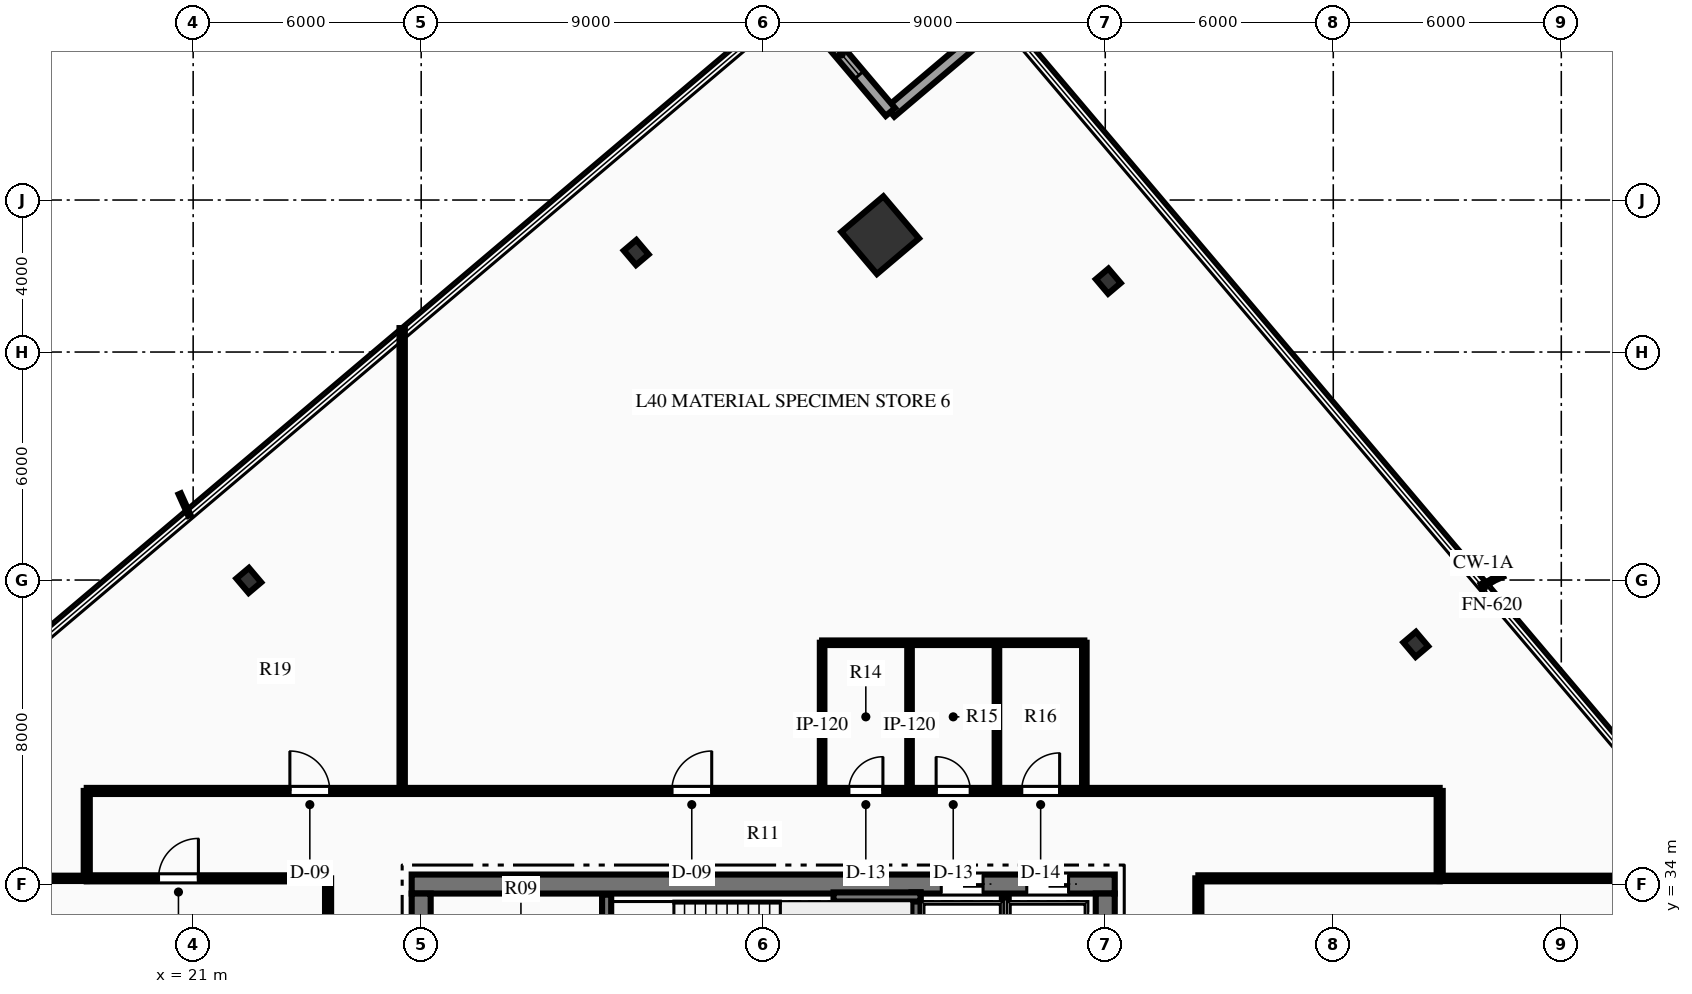
"""IFC4 building model, lengths in metres.
Left out: names, types, materials, properties, quantities, classifications, styles, units other than length and angle.
Written with IfcOpenShell. Run it as: python <this file> out.ifc"""

import sys

from ifc_helpers import new_model, si_unit, direction, frame, frame_2d, origin, origin_2d, place, context, subcontext, project, spatial, rectangle, hollow_rectangle, i_section, extrude, element, fill, save


model = new_model("IFC4")
c1 = context("Model", 3, precision=1e-05, world=origin(), true_north=direction((0.0, 1.0)))
c2 = subcontext(c1, "Body", "Model", "MODEL_VIEW")
j1 = project(units=[si_unit("LENGTHUNIT", "METRE"), si_unit("PLANEANGLEUNIT", "RADIAN")], contexts=[c1])
p1 = place(None, origin())
s1 = spatial("IfcSite", under=j1, at=p1, CompositionType="ELEMENT")
p2 = place(p1, origin())
s2 = spatial("IfcBuilding", under=s1, at=p2, CompositionType="ELEMENT")
p3 = place(p2, frame((0.0, 0.0, 163.2)))
s3 = spatial("IfcBuildingStorey", under=s2, at=p3, CompositionType="ELEMENT", Elevation=163.2)
p4 = place(p3, frame((26.75, 34.0, 0.0), z_axis=(0.0, 0.0, 1.0), x_axis=(1.0, 0.0, 0.0)))
e1 = element("IfcWall", 1, at=p4, inside=s3, PredefinedType="SHEAR", context=c2, shape_type="SweptSolid", body=[
    extrude(rectangle(XDim=18.5, YDim=0.5, at=frame_2d((9.25, 0.0))), origin(), (0.0, 0.0, 1.0), 3.75),
])
p5 = place(p4, frame((13.935, 0.0, 0.0)))
e2 = element("IfcOpeningElement", 2, at=p5, cuts=e1, PredefinedType="OPENING", context=c2, shape_type="SweptSolid", body=[
    extrude(rectangle(XDim=1.1, YDim=2.15, at=frame_2d((0.55, 1.075))), frame((0.0, 0.26, 0.0), z_axis=(0.0, -1.0, 0.0), x_axis=(1.0, 0.0, 0.0)), (0.0, 0.0, 1.0), 0.52),
])
p6 = place(p4, frame((16.185, 0.0, 0.0)))
e3 = element("IfcOpeningElement", 3, at=p6, cuts=e1, PredefinedType="OPENING", context=c2, shape_type="SweptSolid", body=[
    extrude(rectangle(XDim=1.1, YDim=2.15, at=frame_2d((0.55, 1.075))), frame((0.0, 0.26, 0.0), z_axis=(0.0, -1.0, 0.0), x_axis=(1.0, 0.0, 0.0)), (0.0, 0.0, 1.0), 0.52),
])
p7 = place(p3, frame((27.0, 18.25, 0.0), z_axis=(0.0, 0.0, 1.0), x_axis=(0.0, 1.0, 0.0)))
e4 = element("IfcWall", 4, at=p7, inside=s3, PredefinedType="SHEAR", context=c2, shape_type="SweptSolid", body=[
    extrude(rectangle(XDim=15.5, YDim=0.5, at=frame_2d((7.75, 0.0))), origin(), (0.0, 0.0, 1.0), 3.75),
])
p8 = place(p7, frame((9.99, 0.0, 0.0)))
e5 = element("IfcOpeningElement", 5, at=p8, cuts=e4, PredefinedType="OPENING", context=c2, shape_type="SweptSolid", body=[
    extrude(rectangle(XDim=1.4, YDim=2.2, at=frame_2d((0.7, 1.1))), frame((0.0, 0.26, 0.0), z_axis=(0.0, -1.0, 0.0), x_axis=(1.0, 0.0, 0.0)), (0.0, 0.0, 1.0), 0.52),
])
p9 = place(p3, frame((45.0, 18.25, 0.0), z_axis=(0.0, 0.0, 1.0), x_axis=(0.0, 1.0, 0.0)))
e6 = element("IfcWall", 6, at=p9, inside=s3, PredefinedType="SHEAR", context=c2, shape_type="SweptSolid", body=[
    extrude(rectangle(XDim=15.5, YDim=0.5, at=frame_2d((7.75, 0.0))), origin(), (0.0, 0.0, 1.0), 3.75),
])
p10 = place(p9, frame((9.99, 0.0, 0.0)))
e7 = element("IfcOpeningElement", 7, at=p10, cuts=e6, PredefinedType="OPENING", context=c2, shape_type="SweptSolid", body=[
    extrude(rectangle(XDim=1.4, YDim=2.2, at=frame_2d((0.7, 1.1))), frame((0.0, 0.26, 0.0), z_axis=(0.0, -1.0, 0.0), x_axis=(1.0, 0.0, 0.0)), (0.0, 0.0, 1.0), 0.52),
])
p11 = place(p3, frame((31.88, 29.93, 0.0), z_axis=(0.0, 0.0, 1.0), x_axis=(0.0, 1.0, 0.0)))
e8 = element("IfcWall", 8, at=p11, inside=s3, PredefinedType="SHEAR", context=c2, shape_type="SweptSolid", body=[
    extrude(rectangle(XDim=3.79, YDim=0.24, at=frame_2d((1.895, 0.0))), origin(), (0.0, 0.0, 1.0), 3.75),
])
p12 = place(p3, frame((40.02, 29.93, 0.0), z_axis=(0.0, 0.0, 1.0), x_axis=(0.0, 1.0, 0.0)))
e9 = element("IfcWall", 9, at=p12, inside=s3, PredefinedType="SHEAR", context=c2, shape_type="SweptSolid", body=[
    extrude(rectangle(XDim=3.85, YDim=0.24, at=frame_2d((1.925, 0.0))), origin(), (0.0, 0.0, 1.0), 3.75),
])
p13 = place(p3, frame((37.85, 33.66, 0.0), z_axis=(0.0, 0.0, 1.0), x_axis=(1.0, 0.0, 0.0)))
e10 = element("IfcWall", 10, at=p13, inside=s3, PredefinedType="SHEAR", context=c2, shape_type="SweptSolid", body=[
    extrude(rectangle(XDim=2.29, YDim=0.24, at=frame_2d((1.145, 0.0))), origin(), (0.0, 0.0, 1.0), 3.75),
])
p14 = place(p3, frame((39.077, 51.075, 0.0), z_axis=(0.0, 0.0, 1.0), x_axis=(0.763232469783, 0.646123979643, 0.0)))
e11 = element("IfcColumn", 11, at=p14, inside=s3, PredefinedType="COLUMN", context=c2, shape_type="SweptSolid", body=[
    extrude(hollow_rectangle(XDim=1.45, YDim=1.45, WallThickness=0.07, at=origin_2d()), origin(), (0.0, 0.0, 1.0), 3.75),
])
for number, where, z_axis, x_axis in (
    (12, (53.171, 40.307, 0.0), (0.0, 0.0, 1.0), (0.763, 0.646, 0.0)),
    (13, (45.08, 49.865, 0.0), (0.0, 0.0, 1.0), (0.763, 0.646, 0.0)),
    (14, (32.657, 50.619, 0.0), (0.0, 0.0, 1.0), (0.763, 0.646, 0.0)),
    (15, (22.464, 41.99, 0.0), (0.0, 0.0, 1.0), (0.763, 0.646, 0.0)),
):
    element("IfcColumn", number, at=place(p3, frame(where, z_axis=z_axis, x_axis=x_axis)), inside=s3, PredefinedType="COLUMN", context=c2, shape_type="SweptSolid", body=[
        extrude(i_section(OverallWidth=0.432, OverallDepth=0.498, WebThickness=0.056, FlangeThickness=0.089, at=origin_2d()), origin(), (0.0, 0.0, 1.0), 3.75),
    ])
p15 = place(p3, frame((39.346, 54.317, 0.0), z_axis=(0.0, 0.0, 1.0), x_axis=(0.763240413737, 0.646114595748, 0.0)))
e16 = element("IfcWall", 16, at=p15, inside=s3, PredefinedType="STANDARD", context=c2, shape_type="SweptSolid", body=[
    extrude(rectangle(XDim=4.0, YDim=0.32, at=frame_2d((2.0, 0.0))), origin(), (0.0, 0.0, 1.0), 3.46),
])
p16 = place(p3, frame((36.762, 57.369, 0.0), z_axis=(0.0, 0.0, 1.0), x_axis=(0.646144695405, -0.763214932113, 0.0)))
e17 = element("IfcWall", 17, at=p16, inside=s3, PredefinedType="STANDARD", context=c2, shape_type="SweptSolid", body=[
    extrude(rectangle(XDim=4.0, YDim=0.32, at=frame_2d((2.0, 0.0))), origin(), (0.0, 0.0, 1.0), 3.46),
])
p17 = place(p16, frame((1.275, 0.0, 0.85)))
e18 = element("IfcOpeningElement", 18, at=p17, cuts=e17, PredefinedType="OPENING", context=c2, shape_type="SweptSolid", body=[
    extrude(rectangle(XDim=1.45, YDim=2.05, at=frame_2d((0.725, 1.025))), frame((0.0, 0.17, 0.0), z_axis=(0.0, -1.0, 0.0), x_axis=(1.0, 0.0, 0.0)), (0.0, 0.0, 1.0), 0.34),
])
p18 = place(p3, frame((42.37, 29.9, 0.0), z_axis=(0.0, 0.0, 1.0), x_axis=(0.0, 1.0, 0.0)))
e19 = element("IfcWall", 19, at=p18, inside=s3, PredefinedType="PARTITIONING", context=c2, shape_type="SweptSolid", body=[
    extrude(rectangle(XDim=3.75, YDim=0.18, at=frame_2d((1.875, 0.0))), origin(), (0.0, 0.0, 1.0), 3.46),
])
p19 = place(p3, frame((18.2, 36.45, 0.0), z_axis=(0.0, 0.0, 1.0), x_axis=(1.0, 0.0, 0.0)))
e20 = element("IfcWall", 20, at=p19, inside=s3, PredefinedType="PARTITIONING", context=c2, shape_type="SweptSolid", body=[
    extrude(rectangle(XDim=35.6, YDim=0.16, at=frame_2d((17.8, 0.0))), origin(), (0.0, 0.0, 1.0), 3.46),
])
p20 = place(p19, frame((20.05, 0.0, 0.0)))
e21 = element("IfcOpeningElement", 21, at=p20, cuts=e20, PredefinedType="OPENING", context=c2, shape_type="SweptSolid", body=[
    extrude(rectangle(XDim=0.9, YDim=2.15, at=frame_2d((0.45, 1.075))), frame((0.0, 0.09, 0.0), z_axis=(0.0, -1.0, 0.0), x_axis=(1.0, 0.0, 0.0)), (0.0, 0.0, 1.0), 0.18),
])
p21 = place(p19, frame((22.35, 0.0, 0.0)))
e22 = element("IfcOpeningElement", 22, at=p21, cuts=e20, PredefinedType="OPENING", context=c2, shape_type="SweptSolid", body=[
    extrude(rectangle(XDim=0.9, YDim=2.15, at=frame_2d((0.45, 1.075))), frame((0.0, 0.09, 0.0), z_axis=(0.0, -1.0, 0.0), x_axis=(1.0, 0.0, 0.0)), (0.0, 0.0, 1.0), 0.18),
])
p22 = place(p19, frame((24.6, 0.0, 0.0)))
e23 = element("IfcOpeningElement", 23, at=p22, cuts=e20, PredefinedType="OPENING", context=c2, shape_type="SweptSolid", body=[
    extrude(rectangle(XDim=1.0, YDim=2.15, at=frame_2d((0.5, 1.075))), frame((0.0, 0.09, 0.0), z_axis=(0.0, -1.0, 0.0), x_axis=(1.0, 0.0, 0.0)), (0.0, 0.0, 1.0), 0.18),
])
p23 = place(p19, frame((5.345, 0.0, 0.0)))
e24 = element("IfcOpeningElement", 24, at=p23, cuts=e20, PredefinedType="OPENING", context=c2, shape_type="SweptSolid", body=[
    extrude(rectangle(XDim=1.05, YDim=2.15, at=frame_2d((0.525, 1.075))), frame((0.0, 0.09, 0.0), z_axis=(0.0, -1.0, 0.0), x_axis=(1.0, 0.0, 0.0)), (0.0, 0.0, 1.0), 0.18),
])
p24 = place(p19, frame((15.395, 0.0, 0.0)))
e25 = element("IfcOpeningElement", 25, at=p24, cuts=e20, PredefinedType="OPENING", context=c2, shape_type="SweptSolid", body=[
    extrude(rectangle(XDim=1.05, YDim=2.15, at=frame_2d((0.525, 1.075))), frame((0.0, 0.09, 0.0), z_axis=(0.0, -1.0, 0.0), x_axis=(1.0, 0.0, 0.0)), (0.0, 0.0, 1.0), 0.18),
])
p25 = place(p3, frame((18.2, 34.15, 0.0), z_axis=(0.0, 0.0, 1.0), x_axis=(1.0, 0.0, 0.0)))
e26 = element("IfcWall", 26, at=p25, inside=s3, PredefinedType="PARTITIONING", context=c2, shape_type="SweptSolid", body=[
    extrude(rectangle(XDim=6.35, YDim=0.16, at=frame_2d((3.175, 0.0))), origin(), (0.0, 0.0, 1.0), 3.46),
])
p26 = place(p25, frame((1.888, 0.0, 0.0)))
e27 = element("IfcOpeningElement", 27, at=p26, cuts=e26, PredefinedType="OPENING", context=c2, shape_type="SweptSolid", body=[
    extrude(rectangle(XDim=1.05, YDim=2.15, at=frame_2d((0.525, 1.075))), frame((0.0, 0.09, 0.0), z_axis=(0.0, -1.0, 0.0), x_axis=(1.0, 0.0, 0.0)), (0.0, 0.0, 1.0), 0.18),
])
p27 = place(p3, frame((47.45, 34.15, 0.0), z_axis=(0.0, 0.0, 1.0), x_axis=(1.0, 0.0, 0.0)))
e28 = element("IfcWall", 28, at=p27, inside=s3, PredefinedType="PARTITIONING", context=c2, shape_type="SweptSolid", body=[
    extrude(rectangle(XDim=6.35, YDim=0.16, at=frame_2d((3.175, 0.0))), origin(), (0.0, 0.0, 1.0), 3.46),
])
p28 = place(p3, frame((24.55, 17.85, 0.0), z_axis=(0.0, 0.0, 1.0), x_axis=(0.0, 1.0, 0.0)))
e29 = element("IfcWall", 29, at=p28, inside=s3, PredefinedType="PARTITIONING", context=c2, shape_type="SweptSolid", body=[
    extrude(rectangle(XDim=16.3, YDim=0.16, at=frame_2d((8.15, 0.0))), origin(), (0.0, 0.0, 1.0), 3.46),
])
p29 = place(p28, frame((6.491, 0.0, 0.0)))
e30 = element("IfcOpeningElement", 30, at=p29, cuts=e29, PredefinedType="OPENING", context=c2, shape_type="SweptSolid", body=[
    extrude(rectangle(XDim=1.05, YDim=2.15, at=frame_2d((0.525, 1.075))), frame((0.0, 0.09, 0.0), z_axis=(0.0, -1.0, 0.0), x_axis=(1.0, 0.0, 0.0)), (0.0, 0.0, 1.0), 0.18),
])
p30 = place(p28, frame((9.777, 0.0, 0.0)))
e31 = element("IfcOpeningElement", 31, at=p30, cuts=e29, PredefinedType="OPENING", context=c2, shape_type="SweptSolid", body=[
    extrude(rectangle(XDim=1.05, YDim=2.15, at=frame_2d((0.525, 1.075))), frame((0.0, 0.09, 0.0), z_axis=(0.0, -1.0, 0.0), x_axis=(1.0, 0.0, 0.0)), (0.0, 0.0, 1.0), 0.18),
])
p31 = place(p3, frame((47.45, 27.25, 0.0), z_axis=(0.0, 0.0, 1.0), x_axis=(0.0, 1.0, 0.0)))
e32 = element("IfcWall", 32, at=p31, inside=s3, PredefinedType="PARTITIONING", context=c2, shape_type="SweptSolid", body=[
    extrude(rectangle(XDim=6.9, YDim=0.16, at=frame_2d((3.45, 0.0))), origin(), (0.0, 0.0, 1.0), 3.46),
])
p32 = place(p31, frame((1.683, 0.0, 0.0)))
e33 = element("IfcOpeningElement", 33, at=p32, cuts=e32, PredefinedType="OPENING", context=c2, shape_type="SweptSolid", body=[
    extrude(rectangle(XDim=1.05, YDim=2.15, at=frame_2d((0.525, 1.075))), frame((0.0, 0.09, 0.0), z_axis=(0.0, -1.0, 0.0), x_axis=(1.0, 0.0, 0.0)), (0.0, 0.0, 1.0), 0.18),
])
for number, where, z_axis, x_axis in (
    (34, (18.2, 34.15, 0.0), (0.0, 0.0, 1.0), (0.0, 1.0, 0.0)),
    (35, (53.8, 34.15, 0.0), (0.0, 0.0, 1.0), (0.0, 1.0, 0.0)),
):
    element("IfcWall", number, at=place(p3, frame(where, z_axis=z_axis, x_axis=x_axis)), inside=s3, PredefinedType="PARTITIONING", context=c2, shape_type="SweptSolid", body=[
        extrude(rectangle(XDim=2.3, YDim=0.16, at=frame_2d((1.15, 0.0))), origin(), (0.0, 0.0, 1.0), 3.46),
    ])
for number, where, z_axis, x_axis in (
    (36, (37.55, 36.45, 0.0), (0.0, 0.0, 1.0), (0.0, 1.0, 0.0)),
    (37, (39.85, 36.45, 0.0), (0.0, 0.0, 1.0), (0.0, 1.0, 0.0)),
    (38, (42.15, 36.45, 0.0), (0.0, 0.0, 1.0), (0.0, 1.0, 0.0)),
    (39, (44.45, 36.45, 0.0), (0.0, 0.0, 1.0), (0.0, 1.0, 0.0)),
):
    element("IfcWall", number, at=place(p3, frame(where, z_axis=z_axis, x_axis=x_axis)), inside=s3, PredefinedType="PARTITIONING", context=c2, shape_type="SweptSolid", body=[
        extrude(rectangle(XDim=3.9, YDim=0.12, at=frame_2d((1.95, 0.0))), origin(), (0.0, 0.0, 1.0), 3.46),
    ])
p33 = place(p3, frame((37.55, 40.35, 0.0), z_axis=(0.0, 0.0, 1.0), x_axis=(1.0, 0.0, 0.0)))
e40 = element("IfcWall", 40, at=p33, inside=s3, PredefinedType="PARTITIONING", context=c2, shape_type="SweptSolid", body=[
    extrude(rectangle(XDim=6.9, YDim=0.12, at=frame_2d((3.45, 0.0))), origin(), (0.0, 0.0, 1.0), 3.46),
])
p34 = place(p3, frame((9.396, 34.15, 0.0), z_axis=(0.0, 0.0, 1.0), x_axis=(1.0, 0.0, 0.0)))
e41 = element("IfcWall", 41, at=p34, inside=s3, PredefinedType="PARTITIONING", context=c2, shape_type="SweptSolid", body=[
    extrude(rectangle(XDim=8.804, YDim=0.14, at=frame_2d((4.402, 0.0))), origin(), (0.0, 0.0, 1.0), 3.46),
])
p35 = place(p3, frame((53.8, 34.15, 0.0), z_axis=(0.0, 0.0, 1.0), x_axis=(1.0, 0.0, 0.0)))
e42 = element("IfcWall", 42, at=p35, inside=s3, PredefinedType="PARTITIONING", context=c2, shape_type="SweptSolid", body=[
    extrude(rectangle(XDim=7.807, YDim=0.14, at=frame_2d((3.903, 0.0))), origin(), (0.0, 0.0, 1.0), 3.46),
])
p36 = place(p3, frame((26.5, 36.45, 0.0), z_axis=(0.0, 0.0, 1.0), x_axis=(0.0, 1.0, 0.0)))
e43 = element("IfcWall", 43, at=p36, inside=s3, PredefinedType="PARTITIONING", context=c2, shape_type="SweptSolid", body=[
    extrude(rectangle(XDim=12.18, YDim=0.14, at=frame_2d((6.09, 0.0))), origin(), (0.0, 0.0, 1.0), 3.46),
])
p37 = place(p17, origin())
e44 = element("IfcWindow", 44, at=p37, inside=s3, PartitioningType="SINGLE_PANEL", PredefinedType="WINDOW", context=c2, shape_type="SweptSolid", body=[
    extrude(rectangle(XDim=1.45, YDim=2.05, at=frame_2d((0.725, 1.025))), frame((0.0, 0.03, 0.0), z_axis=(0.0, -1.0, 0.0), x_axis=(1.0, 0.0, 0.0)), (0.0, 0.0, 1.0), 0.06),
])
fill(e18, e44)
p38 = place(p20, origin())
e45 = element("IfcDoor", 45, at=p38, inside=s3, OperationType="SINGLE_SWING_RIGHT", PredefinedType="DOOR", context=c2, shape_type="SweptSolid", body=[
    extrude(rectangle(XDim=0.9, YDim=2.15, at=frame_2d((0.45, 1.075))), frame((0.0, 0.025, 0.0), z_axis=(0.0, -1.0, 0.0), x_axis=(1.0, 0.0, 0.0)), (0.0, 0.0, 1.0), 0.05),
])
fill(e21, e45)
p39 = place(p21, origin())
e46 = element("IfcDoor", 46, at=p39, inside=s3, OperationType="SINGLE_SWING_LEFT", PredefinedType="DOOR", context=c2, shape_type="SweptSolid", body=[
    extrude(rectangle(XDim=0.9, YDim=2.15, at=frame_2d((0.45, 1.075))), frame((0.0, 0.025, 0.0), z_axis=(0.0, -1.0, 0.0), x_axis=(1.0, 0.0, 0.0)), (0.0, 0.0, 1.0), 0.05),
])
fill(e22, e46)
p40 = place(p22, origin())
e47 = element("IfcDoor", 47, at=p40, inside=s3, OperationType="SINGLE_SWING_RIGHT", PredefinedType="DOOR", context=c2, shape_type="SweptSolid", body=[
    extrude(rectangle(XDim=1.0, YDim=2.15, at=frame_2d((0.5, 1.075))), frame((0.0, 0.025, 0.0), z_axis=(0.0, -1.0, 0.0), x_axis=(1.0, 0.0, 0.0)), (0.0, 0.0, 1.0), 0.05),
])
fill(e23, e47)
p41 = place(p23, origin())
e48 = element("IfcDoor", 48, at=p41, inside=s3, OperationType="SINGLE_SWING_LEFT", PredefinedType="DOOR", context=c2, shape_type="SweptSolid", body=[
    extrude(rectangle(XDim=1.05, YDim=2.15, at=frame_2d((0.525, 1.075))), frame((0.0, 0.025, 0.0), z_axis=(0.0, -1.0, 0.0), x_axis=(1.0, 0.0, 0.0)), (0.0, 0.0, 1.0), 0.05),
])
fill(e24, e48)
p42 = place(p24, origin())
e49 = element("IfcDoor", 49, at=p42, inside=s3, OperationType="SINGLE_SWING_RIGHT", PredefinedType="DOOR", context=c2, shape_type="SweptSolid", body=[
    extrude(rectangle(XDim=1.05, YDim=2.15, at=frame_2d((0.525, 1.075))), frame((0.0, 0.025, 0.0), z_axis=(0.0, -1.0, 0.0), x_axis=(1.0, 0.0, 0.0)), (0.0, 0.0, 1.0), 0.05),
])
fill(e25, e49)
p43 = place(p26, origin())
e50 = element("IfcDoor", 50, at=p43, inside=s3, OperationType="SINGLE_SWING_RIGHT", PredefinedType="DOOR", context=c2, shape_type="SweptSolid", body=[
    extrude(rectangle(XDim=1.05, YDim=2.15, at=frame_2d((0.525, 1.075))), frame((0.0, 0.025, 0.0), z_axis=(0.0, -1.0, 0.0), x_axis=(1.0, 0.0, 0.0)), (0.0, 0.0, 1.0), 0.05),
])
fill(e27, e50)
p44 = place(p5, origin())
e51 = element("IfcDoor", 51, at=p44, inside=s3, OperationType="SLIDING_TO_LEFT", PredefinedType="DOOR", context=c2, shape_type="SweptSolid", body=[
    extrude(rectangle(XDim=1.1, YDim=2.15, at=frame_2d((0.55, 1.075))), frame((0.0, 0.025, 0.0), z_axis=(0.0, -1.0, 0.0), x_axis=(1.0, 0.0, 0.0)), (0.0, 0.0, 1.0), 0.05),
])
fill(e2, e51)
p45 = place(p6, origin())
e52 = element("IfcDoor", 52, at=p45, inside=s3, OperationType="SLIDING_TO_LEFT", PredefinedType="DOOR", context=c2, shape_type="SweptSolid", body=[
    extrude(rectangle(XDim=1.1, YDim=2.15, at=frame_2d((0.55, 1.075))), frame((0.0, 0.025, 0.0), z_axis=(0.0, -1.0, 0.0), x_axis=(1.0, 0.0, 0.0)), (0.0, 0.0, 1.0), 0.05),
])
fill(e3, e52)
save(model, sys.argv[1])
